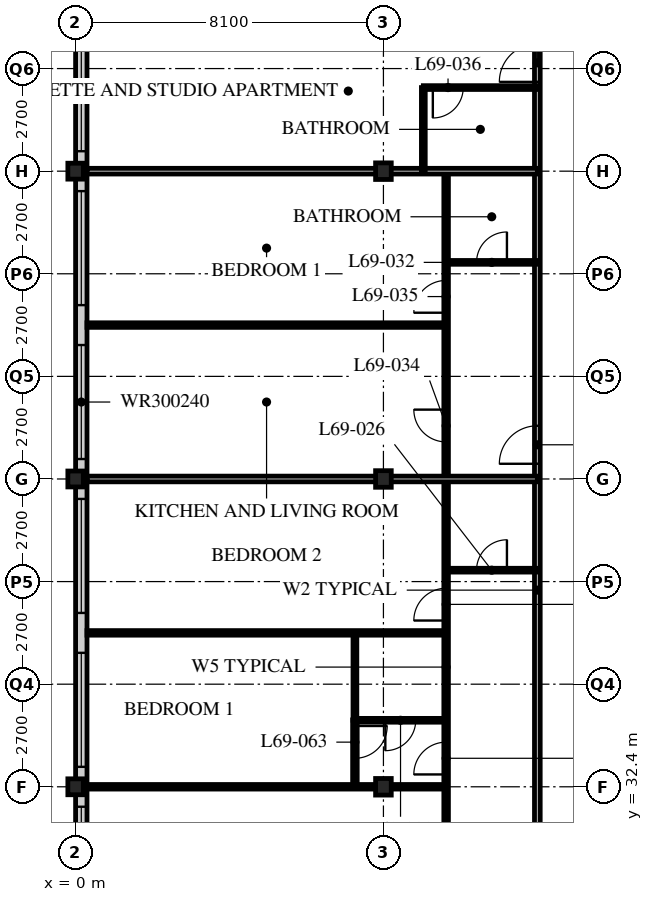
"""IFC4 building model, lengths in metres.
Left out: names, types, materials, properties, quantities, classifications, styles, units other than length and angle.
Written with IfcOpenShell. Run it as: python <this file> out.ifc"""

import sys

from ifc_helpers import new_model, si_unit, direction, frame, frame_2d, origin, origin_2d, place, context, subcontext, project, spatial, rectangle, i_section, extrude, element, fill, save


model = new_model("IFC4")
c1 = context("Model", 3, precision=1e-05, world=origin(), true_north=direction((0.0, 1.0)))
c2 = subcontext(c1, "Body", "Model", "MODEL_VIEW")
j1 = project(units=[si_unit("LENGTHUNIT", "METRE"), si_unit("PLANEANGLEUNIT", "RADIAN")], contexts=[c1])
p1 = place(None, origin())
s1 = spatial("IfcSite", under=j1, at=p1, CompositionType="ELEMENT")
p2 = place(p1, origin())
s2 = spatial("IfcBuilding", under=s1, at=p2, CompositionType="ELEMENT")
p3 = place(p2, frame((0.0, 0.0, 269.7)))
s3 = spatial("IfcBuildingStorey", under=s2, at=p3, CompositionType="ELEMENT", Elevation=269.7)
for number, where, z_axis, x_axis in (
    (1, (0.0, 32.4, 0.0), (0.0, 0.0, 1.0), (1.0, 0.0, 0.0)),
    (2, (0.0, 40.5, 0.0), (0.0, 0.0, 1.0), (1.0, 0.0, 0.0)),
    (3, (0.0, 48.6, 0.0), (0.0, 0.0, 1.0), (1.0, 0.0, 0.0)),
):
    element("IfcColumn", number, at=place(p3, frame(where, z_axis=z_axis, x_axis=x_axis)), inside=s3, PredefinedType="COLUMN", context=c2, shape_type="SweptSolid", body=[
        extrude(i_section(OverallWidth=0.407, OverallDepth=0.419, WebThickness=0.031, FlangeThickness=0.049, FilletRadius=0.015, at=origin_2d()), origin(), (0.0, 0.0, 1.0), 3.9),
    ])
for number, where, z_axis, x_axis in (
    (4, (8.1, 32.4, 0.0), (0.0, 0.0, 1.0), (1.0, 0.0, 0.0)),
    (5, (8.1, 40.5, 0.0), (0.0, 0.0, 1.0), (1.0, 0.0, 0.0)),
    (6, (8.1, 48.6, 0.0), (0.0, 0.0, 1.0), (1.0, 0.0, 0.0)),
):
    element("IfcColumn", number, at=place(p3, frame(where, z_axis=z_axis, x_axis=x_axis)), inside=s3, PredefinedType="COLUMN", context=c2, shape_type="SweptSolid", body=[
        extrude(i_section(OverallWidth=0.412, OverallDepth=0.437, WebThickness=0.036, FlangeThickness=0.058, FilletRadius=0.015, at=origin_2d()), origin(), (0.0, 0.0, 1.0), 3.9),
    ])
p4 = place(p3, frame((0.15, 56.4, 0.0), z_axis=(0.0, 0.0, 1.0), x_axis=(0.0, -1.0, 0.0)))
e7 = element("IfcWall", 7, at=p4, inside=s3, PredefinedType="SOLIDWALL", context=c2, shape_type="SweptSolid", body=[
    extrude(rectangle(XDim=32.1, YDim=0.3, at=frame_2d((16.05, 0.0))), origin(), (0.0, 0.0, 1.0), 3.69),
])
p5 = place(p4, frame((0.225, 0.0, 0.6)))
e8 = element("IfcOpeningElement", 8, at=p5, cuts=e7, PredefinedType="OPENING", context=c2, shape_type="SweptSolid", body=[
    extrude(rectangle(XDim=3.0, YDim=2.4, at=frame_2d((1.5, 1.2))), frame((0.0, 0.16, 0.0), z_axis=(0.0, -1.0, 0.0), x_axis=(1.0, 0.0, 0.0)), (0.0, 0.0, 1.0), 0.32),
])
p6 = place(p4, frame((4.275, 0.0, 0.6)))
e9 = element("IfcOpeningElement", 9, at=p6, cuts=e7, PredefinedType="OPENING", context=c2, shape_type="SweptSolid", body=[
    extrude(rectangle(XDim=3.0, YDim=2.4, at=frame_2d((1.5, 1.2))), frame((0.0, 0.16, 0.0), z_axis=(0.0, -1.0, 0.0), x_axis=(1.0, 0.0, 0.0)), (0.0, 0.0, 1.0), 0.32),
])
p7 = place(p4, frame((8.325, 0.0, 0.6)))
e10 = element("IfcOpeningElement", 10, at=p7, cuts=e7, PredefinedType="OPENING", context=c2, shape_type="SweptSolid", body=[
    extrude(rectangle(XDim=3.0, YDim=2.4, at=frame_2d((1.5, 1.2))), frame((0.0, 0.16, 0.0), z_axis=(0.0, -1.0, 0.0), x_axis=(1.0, 0.0, 0.0)), (0.0, 0.0, 1.0), 0.32),
])
p8 = place(p4, frame((12.375, 0.0, 0.6)))
e11 = element("IfcOpeningElement", 11, at=p8, cuts=e7, PredefinedType="OPENING", context=c2, shape_type="SweptSolid", body=[
    extrude(rectangle(XDim=3.0, YDim=2.4, at=frame_2d((1.5, 1.2))), frame((0.0, 0.16, 0.0), z_axis=(0.0, -1.0, 0.0), x_axis=(1.0, 0.0, 0.0)), (0.0, 0.0, 1.0), 0.32),
])
p9 = place(p4, frame((16.425, 0.0, 0.6)))
e12 = element("IfcOpeningElement", 12, at=p9, cuts=e7, PredefinedType="OPENING", context=c2, shape_type="SweptSolid", body=[
    extrude(rectangle(XDim=3.0, YDim=2.4, at=frame_2d((1.5, 1.2))), frame((0.0, 0.16, 0.0), z_axis=(0.0, -1.0, 0.0), x_axis=(1.0, 0.0, 0.0)), (0.0, 0.0, 1.0), 0.32),
])
p10 = place(p4, frame((20.475, 0.0, 0.6)))
e13 = element("IfcOpeningElement", 13, at=p10, cuts=e7, PredefinedType="OPENING", context=c2, shape_type="SweptSolid", body=[
    extrude(rectangle(XDim=3.0, YDim=2.4, at=frame_2d((1.5, 1.2))), frame((0.0, 0.16, 0.0), z_axis=(0.0, -1.0, 0.0), x_axis=(1.0, 0.0, 0.0)), (0.0, 0.0, 1.0), 0.32),
])
p11 = place(p4, frame((24.525, 0.0, 0.6)))
e14 = element("IfcOpeningElement", 14, at=p11, cuts=e7, PredefinedType="OPENING", context=c2, shape_type="SweptSolid", body=[
    extrude(rectangle(XDim=3.0, YDim=2.4, at=frame_2d((1.5, 1.2))), frame((0.0, 0.16, 0.0), z_axis=(0.0, -1.0, 0.0), x_axis=(1.0, 0.0, 0.0)), (0.0, 0.0, 1.0), 0.32),
])
p12 = place(p4, frame((28.575, 0.0, 0.6)))
e15 = element("IfcOpeningElement", 15, at=p12, cuts=e7, PredefinedType="OPENING", context=c2, shape_type="SweptSolid", body=[
    extrude(rectangle(XDim=3.0, YDim=2.4, at=frame_2d((1.5, 1.2))), frame((0.0, 0.16, 0.0), z_axis=(0.0, -1.0, 0.0), x_axis=(1.0, 0.0, 0.0)), (0.0, 0.0, 1.0), 0.32),
])
p13 = place(p3, frame((12.15, 22.5, 0.0), z_axis=(0.0, 0.0, 1.0), x_axis=(0.0, 1.0, 0.0)))
e16 = element("IfcWall", 16, at=p13, inside=s3, PredefinedType="PARTITIONING", context=c2, shape_type="SweptSolid", body=[
    extrude(rectangle(XDim=30.15, YDim=0.15, at=frame_2d((15.075, 0.0))), origin(), (0.0, 0.0, 1.0), 3.69),
])
p14 = place(p13, frame((0.4, 0.0, 0.0)))
e17 = element("IfcOpeningElement", 17, at=p14, cuts=e16, PredefinedType="OPENING", context=c2, shape_type="SweptSolid", body=[
    extrude(rectangle(XDim=1.0, YDim=2.1, at=frame_2d((0.5, 1.05))), frame((0.0, 0.085, 0.0), z_axis=(0.0, -1.0, 0.0), x_axis=(1.0, 0.0, 0.0)), (0.0, 0.0, 1.0), 0.17),
])
p15 = place(p13, frame((18.4, 0.0, 0.0)))
e18 = element("IfcOpeningElement", 18, at=p15, cuts=e16, PredefinedType="OPENING", context=c2, shape_type="SweptSolid", body=[
    extrude(rectangle(XDim=1.0, YDim=2.1, at=frame_2d((0.5, 1.05))), frame((0.0, 0.085, 0.0), z_axis=(0.0, -1.0, 0.0), x_axis=(1.0, 0.0, 0.0)), (0.0, 0.0, 1.0), 0.17),
])
p16 = place(p13, frame((28.45, 0.0, 0.0)))
e19 = element("IfcOpeningElement", 19, at=p16, cuts=e16, PredefinedType="OPENING", context=c2, shape_type="SweptSolid", body=[
    extrude(rectangle(XDim=1.0, YDim=2.1, at=frame_2d((0.5, 1.05))), frame((0.0, 0.085, 0.0), z_axis=(0.0, -1.0, 0.0), x_axis=(1.0, 0.0, 0.0)), (0.0, 0.0, 1.0), 0.17),
])
p17 = place(p3, frame((9.75, 22.5, 0.0), z_axis=(0.0, 0.0, 1.0), x_axis=(0.0, 1.0, 0.0)))
e20 = element("IfcWall", 20, at=p17, inside=s3, PredefinedType="PARTITIONING", context=c2, shape_type="SweptSolid", body=[
    extrude(rectangle(XDim=26.1, YDim=0.12, at=frame_2d((13.05, 0.0))), origin(), (0.0, 0.0, 1.0), 3.69),
])
p18 = place(p17, frame((0.975, 0.0, 0.0)))
e21 = element("IfcOpeningElement", 21, at=p18, cuts=e20, PredefinedType="OPENING", context=c2, shape_type="SweptSolid", body=[
    extrude(rectangle(XDim=0.85, YDim=2.1, at=frame_2d((0.425, 1.05))), frame((0.0, 0.07, 0.0), z_axis=(0.0, -1.0, 0.0), x_axis=(1.0, 0.0, 0.0)), (0.0, 0.0, 1.0), 0.14),
])
p19 = place(p17, frame((10.225, 0.0, 0.0)))
e22 = element("IfcOpeningElement", 22, at=p19, cuts=e20, PredefinedType="OPENING", context=c2, shape_type="SweptSolid", body=[
    extrude(rectangle(XDim=0.85, YDim=2.1, at=frame_2d((0.425, 1.05))), frame((0.0, 0.07, 0.0), z_axis=(0.0, -1.0, 0.0), x_axis=(1.0, 0.0, 0.0)), (0.0, 0.0, 1.0), 0.14),
])
p20 = place(p17, frame((14.275, 0.0, 0.0)))
e23 = element("IfcOpeningElement", 23, at=p20, cuts=e20, PredefinedType="OPENING", context=c2, shape_type="SweptSolid", body=[
    extrude(rectangle(XDim=0.85, YDim=2.1, at=frame_2d((0.425, 1.05))), frame((0.0, 0.07, 0.0), z_axis=(0.0, -1.0, 0.0), x_axis=(1.0, 0.0, 0.0)), (0.0, 0.0, 1.0), 0.14),
])
p21 = place(p17, frame((18.975, 0.0, 0.0)))
e24 = element("IfcOpeningElement", 24, at=p21, cuts=e20, PredefinedType="OPENING", context=c2, shape_type="SweptSolid", body=[
    extrude(rectangle(XDim=0.85, YDim=2.1, at=frame_2d((0.425, 1.05))), frame((0.0, 0.07, 0.0), z_axis=(0.0, -1.0, 0.0), x_axis=(1.0, 0.0, 0.0)), (0.0, 0.0, 1.0), 0.14),
])
p22 = place(p17, frame((22.375, 0.0, 0.0)))
e25 = element("IfcOpeningElement", 25, at=p22, cuts=e20, PredefinedType="OPENING", context=c2, shape_type="SweptSolid", body=[
    extrude(rectangle(XDim=0.85, YDim=2.1, at=frame_2d((0.425, 1.05))), frame((0.0, 0.07, 0.0), z_axis=(0.0, -1.0, 0.0), x_axis=(1.0, 0.0, 0.0)), (0.0, 0.0, 1.0), 0.14),
])
p23 = place(p3, frame((12.15, 38.1, 0.0), z_axis=(0.0, 0.0, 1.0), x_axis=(-1.0, 0.0, 0.0)))
e26 = element("IfcWall", 26, at=p23, inside=s3, PredefinedType="PARTITIONING", context=c2, shape_type="SweptSolid", body=[
    extrude(rectangle(XDim=2.4, YDim=0.1, at=frame_2d((1.2, 0.0))), origin(), (0.0, 0.0, 1.0), 3.69),
])
p24 = place(p23, frame((0.8, 0.0, 0.0)))
e27 = element("IfcOpeningElement", 27, at=p24, cuts=e26, PredefinedType="OPENING", context=c2, shape_type="SweptSolid", body=[
    extrude(rectangle(XDim=0.8, YDim=2.1, at=frame_2d((0.4, 1.05))), frame((0.0, 0.06, 0.0), z_axis=(0.0, -1.0, 0.0), x_axis=(1.0, 0.0, 0.0)), (0.0, 0.0, 1.0), 0.12),
])
p25 = place(p3, frame((9.75, 34.15, 0.0), z_axis=(0.0, 0.0, 1.0), x_axis=(-1.0, 0.0, 0.0)))
e28 = element("IfcWall", 28, at=p25, inside=s3, PredefinedType="PARTITIONING", context=c2, shape_type="SweptSolid", body=[
    extrude(rectangle(XDim=2.4, YDim=0.1, at=frame_2d((1.2, 0.0))), origin(), (0.0, 0.0, 1.0), 3.69),
])
p26 = place(p25, frame((0.8, 0.0, 0.0)))
e29 = element("IfcOpeningElement", 29, at=p26, cuts=e28, PredefinedType="OPENING", context=c2, shape_type="SweptSolid", body=[
    extrude(rectangle(XDim=0.8, YDim=2.1, at=frame_2d((0.4, 1.05))), frame((0.0, 0.06, 0.0), z_axis=(0.0, -1.0, 0.0), x_axis=(1.0, 0.0, 0.0)), (0.0, 0.0, 1.0), 0.12),
])
p27 = place(p3, frame((7.35, 34.15, 0.0), z_axis=(0.0, 0.0, 1.0), x_axis=(0.0, 1.0, 0.0)))
e30 = element("IfcWall", 30, at=p27, inside=s3, PredefinedType="PARTITIONING", context=c2, shape_type="SweptSolid", body=[
    extrude(rectangle(XDim=2.3, YDim=0.1, at=frame_2d((1.15, 0.0))), origin(), (0.0, 0.0, 1.0), 3.69),
])
p28 = place(p3, frame((9.75, 32.4, 0.0), z_axis=(0.0, 0.0, 1.0), x_axis=(-1.0, 0.0, 0.0)))
e31 = element("IfcWall", 31, at=p28, inside=s3, PredefinedType="PARTITIONING", context=c2, shape_type="SweptSolid", body=[
    extrude(rectangle(XDim=9.45, YDim=0.12, at=frame_2d((4.725, 0.0))), origin(), (0.0, 0.0, 1.0), 3.078),
])
p29 = place(p3, frame((9.75, 36.45, 0.0), z_axis=(0.0, 0.0, 1.0), x_axis=(-1.0, 0.0, 0.0)))
e32 = element("IfcWall", 32, at=p29, inside=s3, PredefinedType="PARTITIONING", context=c2, shape_type="SweptSolid", body=[
    extrude(rectangle(XDim=9.45, YDim=0.12, at=frame_2d((4.725, 0.0))), origin(), (0.0, 0.0, 1.0), 3.69),
])
p30 = place(p3, frame((12.15, 40.5, 0.0), z_axis=(0.0, 0.0, 1.0), x_axis=(-1.0, 0.0, 0.0)))
e33 = element("IfcWall", 33, at=p30, inside=s3, PredefinedType="PARTITIONING", context=c2, shape_type="SweptSolid", body=[
    extrude(rectangle(XDim=11.85, YDim=0.15, at=frame_2d((5.925, 0.0))), origin(), (0.0, 0.0, 1.0), 3.078),
])
p31 = place(p3, frame((12.15, 46.2, 0.0), z_axis=(0.0, 0.0, 1.0), x_axis=(-1.0, 0.0, 0.0)))
e34 = element("IfcWall", 34, at=p31, inside=s3, PredefinedType="PARTITIONING", context=c2, shape_type="SweptSolid", body=[
    extrude(rectangle(XDim=2.4, YDim=0.1, at=frame_2d((1.2, 0.0))), origin(), (0.0, 0.0, 1.0), 3.69),
])
p32 = place(p31, frame((0.8, 0.0, 0.0)))
e35 = element("IfcOpeningElement", 35, at=p32, cuts=e34, PredefinedType="OPENING", context=c2, shape_type="SweptSolid", body=[
    extrude(rectangle(XDim=0.8, YDim=2.1, at=frame_2d((0.4, 1.05))), frame((0.0, 0.06, 0.0), z_axis=(0.0, -1.0, 0.0), x_axis=(1.0, 0.0, 0.0)), (0.0, 0.0, 1.0), 0.12),
])
p33 = place(p3, frame((9.75, 44.55, 0.0), z_axis=(0.0, 0.0, 1.0), x_axis=(-1.0, 0.0, 0.0)))
e36 = element("IfcWall", 36, at=p33, inside=s3, PredefinedType="PARTITIONING", context=c2, shape_type="SweptSolid", body=[
    extrude(rectangle(XDim=9.45, YDim=0.12, at=frame_2d((4.725, 0.0))), origin(), (0.0, 0.0, 1.0), 3.69),
])
p34 = place(p3, frame((12.15, 48.6, 0.0), z_axis=(0.0, 0.0, 1.0), x_axis=(-1.0, 0.0, 0.0)))
e37 = element("IfcWall", 37, at=p34, inside=s3, PredefinedType="PARTITIONING", context=c2, shape_type="SweptSolid", body=[
    extrude(rectangle(XDim=11.85, YDim=0.15, at=frame_2d((5.925, 0.0))), origin(), (0.0, 0.0, 1.0), 3.078),
])
p35 = place(p3, frame((9.15, 48.6, 0.0), z_axis=(0.0, 0.0, 1.0), x_axis=(0.0, 1.0, 0.0)))
e38 = element("IfcWall", 38, at=p35, inside=s3, PredefinedType="PARTITIONING", context=c2, shape_type="SweptSolid", body=[
    extrude(rectangle(XDim=2.2, YDim=0.1, at=frame_2d((1.1, 0.0))), origin(), (0.0, 0.0, 1.0), 3.69),
])
p36 = place(p3, frame((12.15, 50.8, 0.0), z_axis=(0.0, 0.0, 1.0), x_axis=(-1.0, 0.0, 0.0)))
e39 = element("IfcWall", 39, at=p36, inside=s3, PredefinedType="PARTITIONING", context=c2, shape_type="SweptSolid", body=[
    extrude(rectangle(XDim=3.0, YDim=0.1, at=frame_2d((1.5, 0.0))), origin(), (0.0, 0.0, 1.0), 3.69),
])
p37 = place(p36, frame((1.95, 0.0, 0.0)))
e40 = element("IfcOpeningElement", 40, at=p37, cuts=e39, PredefinedType="OPENING", context=c2, shape_type="SweptSolid", body=[
    extrude(rectangle(XDim=0.8, YDim=2.1, at=frame_2d((0.4, 1.05))), frame((0.0, 0.06, 0.0), z_axis=(0.0, -1.0, 0.0), x_axis=(1.0, 0.0, 0.0)), (0.0, 0.0, 1.0), 0.12),
])
p38 = place(p3, frame((7.35, 32.4, 0.0), z_axis=(0.0, 0.0, 1.0), x_axis=(0.0, 1.0, 0.0)))
e41 = element("IfcWall", 41, at=p38, inside=s3, PredefinedType="PARTITIONING", context=c2, shape_type="SweptSolid", body=[
    extrude(rectangle(XDim=1.76, YDim=0.12, at=frame_2d((0.88, 0.0))), origin(), (0.0, 0.0, 1.0), 3.69),
])
p39 = place(p38, frame((0.75, 0.0, 0.0)))
e42 = element("IfcOpeningElement", 42, at=p39, cuts=e41, PredefinedType="OPENING", context=c2, shape_type="SweptSolid", body=[
    extrude(rectangle(XDim=0.85, YDim=2.1, at=frame_2d((0.425, 1.05))), frame((0.0, 0.07, 0.0), z_axis=(0.0, -1.0, 0.0), x_axis=(1.0, 0.0, 0.0)), (0.0, 0.0, 1.0), 0.14),
])
p40 = place(p6, origin())
e43 = element("IfcWindow", 43, at=p40, inside=s3, PartitioningType="SINGLE_PANEL", PredefinedType="WINDOW", context=c2, shape_type="SweptSolid", body=[
    extrude(rectangle(XDim=3.0, YDim=2.4, at=frame_2d((1.5, 1.2))), frame((0.0, 0.03, 0.0), z_axis=(0.0, -1.0, 0.0), x_axis=(1.0, 0.0, 0.0)), (0.0, 0.0, 1.0), 0.06),
])
fill(e9, e43)
p41 = place(p7, origin())
e44 = element("IfcWindow", 44, at=p41, inside=s3, PartitioningType="SINGLE_PANEL", PredefinedType="WINDOW", context=c2, shape_type="SweptSolid", body=[
    extrude(rectangle(XDim=3.0, YDim=2.4, at=frame_2d((1.5, 1.2))), frame((0.0, 0.03, 0.0), z_axis=(0.0, -1.0, 0.0), x_axis=(1.0, 0.0, 0.0)), (0.0, 0.0, 1.0), 0.06),
])
fill(e10, e44)
p42 = place(p8, origin())
e45 = element("IfcWindow", 45, at=p42, inside=s3, PartitioningType="SINGLE_PANEL", PredefinedType="WINDOW", context=c2, shape_type="SweptSolid", body=[
    extrude(rectangle(XDim=3.0, YDim=2.4, at=frame_2d((1.5, 1.2))), frame((0.0, 0.03, 0.0), z_axis=(0.0, -1.0, 0.0), x_axis=(1.0, 0.0, 0.0)), (0.0, 0.0, 1.0), 0.06),
])
fill(e11, e45)
p43 = place(p9, origin())
e46 = element("IfcWindow", 46, at=p43, inside=s3, PartitioningType="SINGLE_PANEL", PredefinedType="WINDOW", context=c2, shape_type="SweptSolid", body=[
    extrude(rectangle(XDim=3.0, YDim=2.4, at=frame_2d((1.5, 1.2))), frame((0.0, 0.03, 0.0), z_axis=(0.0, -1.0, 0.0), x_axis=(1.0, 0.0, 0.0)), (0.0, 0.0, 1.0), 0.06),
])
fill(e12, e46)
p44 = place(p10, origin())
e47 = element("IfcWindow", 47, at=p44, inside=s3, PartitioningType="SINGLE_PANEL", PredefinedType="WINDOW", context=c2, shape_type="SweptSolid", body=[
    extrude(rectangle(XDim=3.0, YDim=2.4, at=frame_2d((1.5, 1.2))), frame((0.0, 0.03, 0.0), z_axis=(0.0, -1.0, 0.0), x_axis=(1.0, 0.0, 0.0)), (0.0, 0.0, 1.0), 0.06),
])
fill(e13, e47)
p45 = place(p11, origin())
e48 = element("IfcWindow", 48, at=p45, inside=s3, PartitioningType="SINGLE_PANEL", PredefinedType="WINDOW", context=c2, shape_type="SweptSolid", body=[
    extrude(rectangle(XDim=3.0, YDim=2.4, at=frame_2d((1.5, 1.2))), frame((0.0, 0.03, 0.0), z_axis=(0.0, -1.0, 0.0), x_axis=(1.0, 0.0, 0.0)), (0.0, 0.0, 1.0), 0.06),
])
fill(e14, e48)
p46 = place(p24, origin())
e49 = element("IfcDoor", 49, at=p46, inside=s3, OperationType="SINGLE_SWING_RIGHT", PredefinedType="DOOR", context=c2, shape_type="SweptSolid", body=[
    extrude(rectangle(XDim=0.8, YDim=2.1, at=frame_2d((0.4, 1.05))), frame((0.0, 0.025, 0.0), z_axis=(0.0, -1.0, 0.0), x_axis=(1.0, 0.0, 0.0)), (0.0, 0.0, 1.0), 0.05),
])
fill(e27, e49)
p47 = place(p26, origin())
e50 = element("IfcDoor", 50, at=p47, inside=s3, OperationType="SINGLE_SWING_RIGHT", PredefinedType="DOOR", context=c2, shape_type="SweptSolid", body=[
    extrude(rectangle(XDim=0.8, YDim=2.1, at=frame_2d((0.4, 1.05))), frame((0.0, 0.025, 0.0), z_axis=(0.0, -1.0, 0.0), x_axis=(1.0, 0.0, 0.0)), (0.0, 0.0, 1.0), 0.05),
])
fill(e29, e50)
p48 = place(p19, origin())
e51 = element("IfcDoor", 51, at=p48, inside=s3, OperationType="SINGLE_SWING_LEFT", PredefinedType="DOOR", context=c2, shape_type="SweptSolid", body=[
    extrude(rectangle(XDim=0.85, YDim=2.1, at=frame_2d((0.425, 1.05))), frame((0.0, 0.025, 0.0), z_axis=(0.0, -1.0, 0.0), x_axis=(1.0, 0.0, 0.0)), (0.0, 0.0, 1.0), 0.05),
])
fill(e22, e51)
p49 = place(p20, origin())
e52 = element("IfcDoor", 52, at=p49, inside=s3, OperationType="SINGLE_SWING_LEFT", PredefinedType="DOOR", context=c2, shape_type="SweptSolid", body=[
    extrude(rectangle(XDim=0.85, YDim=2.1, at=frame_2d((0.425, 1.05))), frame((0.0, 0.025, 0.0), z_axis=(0.0, -1.0, 0.0), x_axis=(1.0, 0.0, 0.0)), (0.0, 0.0, 1.0), 0.05),
])
fill(e23, e52)
p50 = place(p32, origin())
e53 = element("IfcDoor", 53, at=p50, inside=s3, OperationType="SINGLE_SWING_RIGHT", PredefinedType="DOOR", context=c2, shape_type="SweptSolid", body=[
    extrude(rectangle(XDim=0.8, YDim=2.1, at=frame_2d((0.4, 1.05))), frame((0.0, 0.025, 0.0), z_axis=(0.0, -1.0, 0.0), x_axis=(1.0, 0.0, 0.0)), (0.0, 0.0, 1.0), 0.05),
])
fill(e35, e53)
p51 = place(p15, origin())
e54 = element("IfcDoor", 54, at=p51, inside=s3, OperationType="SINGLE_SWING_LEFT", PredefinedType="DOOR", context=c2, shape_type="SweptSolid", body=[
    extrude(rectangle(XDim=1.0, YDim=2.1, at=frame_2d((0.5, 1.05))), frame((0.0, 0.025, 0.0), z_axis=(0.0, -1.0, 0.0), x_axis=(1.0, 0.0, 0.0)), (0.0, 0.0, 1.0), 0.05),
])
fill(e18, e54)
p52 = place(p21, origin())
e55 = element("IfcDoor", 55, at=p52, inside=s3, OperationType="SINGLE_SWING_RIGHT", PredefinedType="DOOR", context=c2, shape_type="SweptSolid", body=[
    extrude(rectangle(XDim=0.85, YDim=2.1, at=frame_2d((0.425, 1.05))), frame((0.0, 0.025, 0.0), z_axis=(0.0, -1.0, 0.0), x_axis=(1.0, 0.0, 0.0)), (0.0, 0.0, 1.0), 0.05),
])
fill(e24, e55)
p53 = place(p22, origin())
e56 = element("IfcDoor", 56, at=p53, inside=s3, OperationType="SINGLE_SWING_LEFT", PredefinedType="DOOR", context=c2, shape_type="SweptSolid", body=[
    extrude(rectangle(XDim=0.85, YDim=2.1, at=frame_2d((0.425, 1.05))), frame((0.0, 0.025, 0.0), z_axis=(0.0, -1.0, 0.0), x_axis=(1.0, 0.0, 0.0)), (0.0, 0.0, 1.0), 0.05),
])
fill(e25, e56)
p54 = place(p37, origin())
e57 = element("IfcDoor", 57, at=p54, inside=s3, OperationType="SINGLE_SWING_RIGHT", PredefinedType="DOOR", context=c2, shape_type="SweptSolid", body=[
    extrude(rectangle(XDim=0.8, YDim=2.1, at=frame_2d((0.4, 1.05))), frame((0.0, 0.025, 0.0), z_axis=(0.0, -1.0, 0.0), x_axis=(1.0, 0.0, 0.0)), (0.0, 0.0, 1.0), 0.05),
])
fill(e40, e57)
p55 = place(p16, origin())
e58 = element("IfcDoor", 58, at=p55, inside=s3, OperationType="SINGLE_SWING_LEFT", PredefinedType="DOOR", context=c2, shape_type="SweptSolid", body=[
    extrude(rectangle(XDim=1.0, YDim=2.1, at=frame_2d((0.5, 1.05))), frame((0.0, 0.025, 0.0), z_axis=(0.0, -1.0, 0.0), x_axis=(1.0, 0.0, 0.0)), (0.0, 0.0, 1.0), 0.05),
])
fill(e19, e58)
p56 = place(p39, origin())
e59 = element("IfcDoor", 59, at=p56, inside=s3, OperationType="SINGLE_SWING_LEFT", PredefinedType="DOOR", context=c2, shape_type="SweptSolid", body=[
    extrude(rectangle(XDim=0.85, YDim=2.1, at=frame_2d((0.425, 1.05))), frame((0.0, 0.025, 0.0), z_axis=(0.0, -1.0, 0.0), x_axis=(1.0, 0.0, 0.0)), (0.0, 0.0, 1.0), 0.05),
])
fill(e42, e59)
save(model, sys.argv[1])
